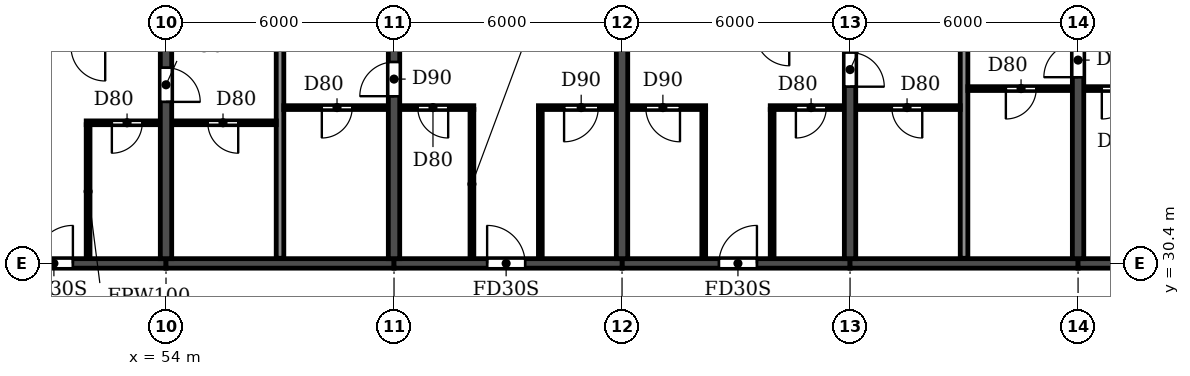
"""IFC4 building model, lengths in metres.
Left out: names, types, materials, properties, quantities, classifications, styles, units other than length and angle.
Written with IfcOpenShell. Run it as: python <this file> out.ifc"""

import sys

from ifc_helpers import new_model, si_unit, direction, frame, frame_2d, origin, place, context, subcontext, project, spatial, rectangle, extrude, element, fill, save


model = new_model("IFC4")
c1 = context("Model", 3, precision=1e-05, world=origin(), true_north=direction((0.0, 1.0)))
c2 = subcontext(c1, "Body", "Model", "MODEL_VIEW")
j1 = project(units=[si_unit("LENGTHUNIT", "METRE"), si_unit("PLANEANGLEUNIT", "RADIAN")], contexts=[c1])
p1 = place(None, origin())
s1 = spatial("IfcSite", under=j1, at=p1, CompositionType="ELEMENT")
p2 = place(p1, origin())
s2 = spatial("IfcBuilding", under=s1, at=p2, CompositionType="ELEMENT")
p3 = place(p2, frame((0.0, 0.0, 125.7)))
s3 = spatial("IfcBuildingStorey", under=s2, at=p3, CompositionType="ELEMENT", Elevation=125.7)
p4 = place(p3, frame((54.0, 30.525, 0.0), z_axis=(0.0, 0.0, 1.0), x_axis=(0.0, 1.0, 0.0)))
e1 = element("IfcWall", 1, at=p4, inside=s3, PredefinedType="SHEAR", context=c2, shape_type="SweptSolid", body=[
    extrude(rectangle(XDim=11.675, YDim=0.3, at=frame_2d((5.837, 0.0))), origin(), (0.0, 0.0, 1.0), 3.07),
])
p5 = place(p4, frame((4.125, 0.0, 0.0)))
e2 = element("IfcOpeningElement", 2, at=p5, cuts=e1, PredefinedType="OPENING", context=c2, shape_type="SweptSolid", body=[
    extrude(rectangle(XDim=0.9, YDim=2.1, at=frame_2d((0.45, 1.05))), frame((0.0, 0.16, 0.0), z_axis=(0.0, -1.0, 0.0), x_axis=(1.0, 0.0, 0.0)), (0.0, 0.0, 1.0), 0.32),
])
p6 = place(p3, frame((60.0, 30.525, 0.0), z_axis=(0.0, 0.0, 1.0), x_axis=(0.0, 1.0, 0.0)))
e3 = element("IfcWall", 3, at=p6, inside=s3, PredefinedType="SHEAR", context=c2, shape_type="SweptSolid", body=[
    extrude(rectangle(XDim=11.675, YDim=0.3, at=frame_2d((5.837, 0.0))), origin(), (0.0, 0.0, 1.0), 3.07),
])
p7 = place(p6, frame((4.275, 0.0, 0.0)))
e4 = element("IfcOpeningElement", 4, at=p7, cuts=e3, PredefinedType="OPENING", context=c2, shape_type="SweptSolid", body=[
    extrude(rectangle(XDim=0.9, YDim=2.1, at=frame_2d((0.45, 1.05))), frame((0.0, 0.16, 0.0), z_axis=(0.0, -1.0, 0.0), x_axis=(1.0, 0.0, 0.0)), (0.0, 0.0, 1.0), 0.32),
])
p8 = place(p3, frame((66.0, 30.525, 0.0), z_axis=(0.0, 0.0, 1.0), x_axis=(0.0, 1.0, 0.0)))
e5 = element("IfcWall", 5, at=p8, inside=s3, PredefinedType="SHEAR", context=c2, shape_type="SweptSolid", body=[
    extrude(rectangle(XDim=11.675, YDim=0.3, at=frame_2d((5.837, 0.0))), origin(), (0.0, 0.0, 1.0), 3.07),
])
p9 = place(p3, frame((72.0, 30.525, 0.0), z_axis=(0.0, 0.0, 1.0), x_axis=(0.0, 1.0, 0.0)))
e6 = element("IfcWall", 6, at=p9, inside=s3, PredefinedType="SHEAR", context=c2, shape_type="SweptSolid", body=[
    extrude(rectangle(XDim=11.675, YDim=0.3, at=frame_2d((5.837, 0.0))), origin(), (0.0, 0.0, 1.0), 3.07),
])
p10 = place(p9, frame((4.525, 0.0, 0.0)))
e7 = element("IfcOpeningElement", 7, at=p10, cuts=e6, PredefinedType="OPENING", context=c2, shape_type="SweptSolid", body=[
    extrude(rectangle(XDim=0.9, YDim=2.1, at=frame_2d((0.45, 1.05))), frame((0.0, 0.16, 0.0), z_axis=(0.0, -1.0, 0.0), x_axis=(1.0, 0.0, 0.0)), (0.0, 0.0, 1.0), 0.32),
])
p11 = place(p3, frame((78.0, 30.525, 0.0), z_axis=(0.0, 0.0, 1.0), x_axis=(0.0, 1.0, 0.0)))
e8 = element("IfcWall", 8, at=p11, inside=s3, PredefinedType="SHEAR", context=c2, shape_type="SweptSolid", body=[
    extrude(rectangle(XDim=11.675, YDim=0.3, at=frame_2d((5.837, 0.0))), origin(), (0.0, 0.0, 1.0), 3.07),
])
p12 = place(p11, frame((4.775, 0.0, 0.0)))
e9 = element("IfcOpeningElement", 9, at=p12, cuts=e8, PredefinedType="OPENING", context=c2, shape_type="SweptSolid", body=[
    extrude(rectangle(XDim=0.9, YDim=2.1, at=frame_2d((0.45, 1.05))), frame((0.0, 0.16, 0.0), z_axis=(0.0, -1.0, 0.0), x_axis=(1.0, 0.0, 0.0)), (0.0, 0.0, 1.0), 0.32),
])
p13 = place(p3, frame((48.0, 30.4, 0.0), z_axis=(0.0, 0.0, 1.0), x_axis=(1.0, 0.0, 0.0)))
e10 = element("IfcWall", 10, at=p13, inside=s3, PredefinedType="SHEAR", context=c2, shape_type="SweptSolid", body=[
    extrude(rectangle(XDim=6.0, YDim=0.25, at=frame_2d((3.0, 0.0))), origin(), (0.0, 0.0, 1.0), 2.47),
])
p14 = place(p13, frame((2.55, 0.0, 0.0)))
e11 = element("IfcOpeningElement", 11, at=p14, cuts=e10, PredefinedType="OPENING", context=c2, shape_type="SweptSolid", body=[
    extrude(rectangle(XDim=1.0, YDim=2.1, at=frame_2d((0.5, 1.05))), frame((0.0, 0.135, 0.0), z_axis=(0.0, -1.0, 0.0), x_axis=(1.0, 0.0, 0.0)), (0.0, 0.0, 1.0), 0.27),
])
p15 = place(p3, frame((54.0, 30.4, 0.0), z_axis=(0.0, 0.0, 1.0), x_axis=(1.0, 0.0, 0.0)))
e12 = element("IfcWall", 12, at=p15, inside=s3, PredefinedType="SHEAR", context=c2, shape_type="SweptSolid", body=[
    extrude(rectangle(XDim=6.0, YDim=0.25, at=frame_2d((3.0, 0.0))), origin(), (0.0, 0.0, 1.0), 2.47),
])
p16 = place(p3, frame((60.0, 30.4, 0.0), z_axis=(0.0, 0.0, 1.0), x_axis=(1.0, 0.0, 0.0)))
e13 = element("IfcWall", 13, at=p16, inside=s3, PredefinedType="SHEAR", context=c2, shape_type="SweptSolid", body=[
    extrude(rectangle(XDim=6.0, YDim=0.25, at=frame_2d((3.0, 0.0))), origin(), (0.0, 0.0, 1.0), 2.47),
])
p17 = place(p16, frame((2.45, 0.0, 0.0)))
e14 = element("IfcOpeningElement", 14, at=p17, cuts=e13, PredefinedType="OPENING", context=c2, shape_type="SweptSolid", body=[
    extrude(rectangle(XDim=1.0, YDim=2.1, at=frame_2d((0.5, 1.05))), frame((0.0, 0.135, 0.0), z_axis=(0.0, -1.0, 0.0), x_axis=(1.0, 0.0, 0.0)), (0.0, 0.0, 1.0), 0.27),
])
p18 = place(p3, frame((66.0, 30.4, 0.0), z_axis=(0.0, 0.0, 1.0), x_axis=(1.0, 0.0, 0.0)))
e15 = element("IfcWall", 15, at=p18, inside=s3, PredefinedType="SHEAR", context=c2, shape_type="SweptSolid", body=[
    extrude(rectangle(XDim=6.0, YDim=0.25, at=frame_2d((3.0, 0.0))), origin(), (0.0, 0.0, 1.0), 2.47),
])
p19 = place(p18, frame((2.55, 0.0, 0.0)))
e16 = element("IfcOpeningElement", 16, at=p19, cuts=e15, PredefinedType="OPENING", context=c2, shape_type="SweptSolid", body=[
    extrude(rectangle(XDim=1.0, YDim=2.1, at=frame_2d((0.5, 1.05))), frame((0.0, 0.135, 0.0), z_axis=(0.0, -1.0, 0.0), x_axis=(1.0, 0.0, 0.0)), (0.0, 0.0, 1.0), 0.27),
])
p20 = place(p3, frame((72.0, 30.4, 0.0), z_axis=(0.0, 0.0, 1.0), x_axis=(1.0, 0.0, 0.0)))
e17 = element("IfcWall", 17, at=p20, inside=s3, PredefinedType="SHEAR", context=c2, shape_type="SweptSolid", body=[
    extrude(rectangle(XDim=6.0, YDim=0.25, at=frame_2d((3.0, 0.0))), origin(), (0.0, 0.0, 1.0), 2.47),
])
p21 = place(p3, frame((78.0, 30.4, 0.0), z_axis=(0.0, 0.0, 1.0), x_axis=(1.0, 0.0, 0.0)))
e18 = element("IfcWall", 18, at=p21, inside=s3, PredefinedType="SHEAR", context=c2, shape_type="SweptSolid", body=[
    extrude(rectangle(XDim=6.0, YDim=0.25, at=frame_2d((3.0, 0.0))), origin(), (0.0, 0.0, 1.0), 2.47),
])
p22 = place(p21, frame((2.45, 0.0, 0.0)))
e19 = element("IfcOpeningElement", 19, at=p22, cuts=e18, PredefinedType="OPENING", context=c2, shape_type="SweptSolid", body=[
    extrude(rectangle(XDim=1.0, YDim=2.1, at=frame_2d((0.5, 1.05))), frame((0.0, 0.135, 0.0), z_axis=(0.0, -1.0, 0.0), x_axis=(1.0, 0.0, 0.0)), (0.0, 0.0, 1.0), 0.27),
])
for number, where, z_axis, x_axis in (
    (20, (57.0, 30.535, 0.0), (0.0, 0.0, 1.0), (0.0, 1.0, 0.0)),
    (21, (75.0, 30.535, 0.0), (0.0, 0.0, 1.0), (0.0, 1.0, 0.0)),
):
    element("IfcWall", number, at=place(p3, frame(where, z_axis=z_axis, x_axis=x_axis)), inside=s3, PredefinedType="PARTITIONING", context=c2, shape_type="SweptSolid", body=[
        extrude(rectangle(XDim=11.805, YDim=0.2, at=frame_2d((5.903, 0.0))), origin(), (0.0, 0.0, 1.0), 3.07),
    ])
p23 = place(p3, frame((51.9, 34.1, 0.0), z_axis=(0.0, 0.0, 1.0), x_axis=(1.0, 0.0, 0.0)))
e22 = element("IfcWall", 22, at=p23, inside=s3, PredefinedType="PARTITIONING", context=c2, shape_type="SweptSolid", body=[
    extrude(rectangle(XDim=1.94, YDim=0.1, at=frame_2d((0.97, 0.0))), origin(), (0.0, 0.0, 1.0), 3.07),
])
p24 = place(p23, frame((0.675, 0.0, 0.0)))
e23 = element("IfcOpeningElement", 23, at=p24, cuts=e22, PredefinedType="OPENING", context=c2, shape_type="SweptSolid", body=[
    extrude(rectangle(XDim=0.8, YDim=2.1, at=frame_2d((0.4, 1.05))), frame((0.0, 0.06, 0.0), z_axis=(0.0, -1.0, 0.0), x_axis=(1.0, 0.0, 0.0)), (0.0, 0.0, 1.0), 0.12),
])
p25 = place(p3, frame((54.16, 34.1, 0.0), z_axis=(0.0, 0.0, 1.0), x_axis=(1.0, 0.0, 0.0)))
e24 = element("IfcWall", 24, at=p25, inside=s3, PredefinedType="PARTITIONING", context=c2, shape_type="SweptSolid", body=[
    extrude(rectangle(XDim=2.74, YDim=0.1, at=frame_2d((1.37, 0.0))), origin(), (0.0, 0.0, 1.0), 3.07),
])
p26 = place(p25, frame((0.94, 0.0, 0.0)))
e25 = element("IfcOpeningElement", 25, at=p26, cuts=e24, PredefinedType="OPENING", context=c2, shape_type="SweptSolid", body=[
    extrude(rectangle(XDim=0.8, YDim=2.1, at=frame_2d((0.4, 1.05))), frame((0.0, 0.06, 0.0), z_axis=(0.0, -1.0, 0.0), x_axis=(1.0, 0.0, 0.0)), (0.0, 0.0, 1.0), 0.12),
])
p27 = place(p3, frame((57.1, 34.5, 0.0), z_axis=(0.0, 0.0, 1.0), x_axis=(1.0, 0.0, 0.0)))
e26 = element("IfcWall", 26, at=p27, inside=s3, PredefinedType="PARTITIONING", context=c2, shape_type="SweptSolid", body=[
    extrude(rectangle(XDim=2.74, YDim=0.1, at=frame_2d((1.37, 0.0))), origin(), (0.0, 0.0, 1.0), 3.07),
])
p28 = place(p27, frame((1.0, 0.0, 0.0)))
e27 = element("IfcOpeningElement", 27, at=p28, cuts=e26, PredefinedType="OPENING", context=c2, shape_type="SweptSolid", body=[
    extrude(rectangle(XDim=0.8, YDim=2.1, at=frame_2d((0.4, 1.05))), frame((0.0, 0.06, 0.0), z_axis=(0.0, -1.0, 0.0), x_axis=(1.0, 0.0, 0.0)), (0.0, 0.0, 1.0), 0.12),
])
p29 = place(p3, frame((60.16, 34.5, 0.0), z_axis=(0.0, 0.0, 1.0), x_axis=(1.0, 0.0, 0.0)))
e28 = element("IfcWall", 28, at=p29, inside=s3, PredefinedType="PARTITIONING", context=c2, shape_type="SweptSolid", body=[
    extrude(rectangle(XDim=1.94, YDim=0.1, at=frame_2d((0.97, 0.0))), origin(), (0.0, 0.0, 1.0), 3.07),
])
p30 = place(p29, frame((0.465, 0.0, 0.0)))
e29 = element("IfcOpeningElement", 29, at=p30, cuts=e28, PredefinedType="OPENING", context=c2, shape_type="SweptSolid", body=[
    extrude(rectangle(XDim=0.8, YDim=2.1, at=frame_2d((0.4, 1.05))), frame((0.0, 0.06, 0.0), z_axis=(0.0, -1.0, 0.0), x_axis=(1.0, 0.0, 0.0)), (0.0, 0.0, 1.0), 0.12),
])
p31 = place(p3, frame((63.8, 34.5, 0.0), z_axis=(0.0, 0.0, 1.0), x_axis=(1.0, 0.0, 0.0)))
e30 = element("IfcWall", 30, at=p31, inside=s3, PredefinedType="PARTITIONING", context=c2, shape_type="SweptSolid", body=[
    extrude(rectangle(XDim=2.04, YDim=0.1, at=frame_2d((1.02, 0.0))), origin(), (0.0, 0.0, 1.0), 3.07),
])
p32 = place(p31, frame((0.675, 0.0, 0.0)))
e31 = element("IfcOpeningElement", 31, at=p32, cuts=e30, PredefinedType="OPENING", context=c2, shape_type="SweptSolid", body=[
    extrude(rectangle(XDim=0.9, YDim=2.1, at=frame_2d((0.45, 1.05))), frame((0.0, 0.06, 0.0), z_axis=(0.0, -1.0, 0.0), x_axis=(1.0, 0.0, 0.0)), (0.0, 0.0, 1.0), 0.12),
])
p33 = place(p3, frame((66.16, 34.5, 0.0), z_axis=(0.0, 0.0, 1.0), x_axis=(1.0, 0.0, 0.0)))
e32 = element("IfcWall", 32, at=p33, inside=s3, PredefinedType="PARTITIONING", context=c2, shape_type="SweptSolid", body=[
    extrude(rectangle(XDim=2.04, YDim=0.1, at=frame_2d((1.02, 0.0))), origin(), (0.0, 0.0, 1.0), 3.07),
])
p34 = place(p33, frame((0.465, 0.0, 0.0)))
e33 = element("IfcOpeningElement", 33, at=p34, cuts=e32, PredefinedType="OPENING", context=c2, shape_type="SweptSolid", body=[
    extrude(rectangle(XDim=0.9, YDim=2.1, at=frame_2d((0.45, 1.05))), frame((0.0, 0.06, 0.0), z_axis=(0.0, -1.0, 0.0), x_axis=(1.0, 0.0, 0.0)), (0.0, 0.0, 1.0), 0.12),
])
p35 = place(p3, frame((69.9, 34.5, 0.0), z_axis=(0.0, 0.0, 1.0), x_axis=(1.0, 0.0, 0.0)))
e34 = element("IfcWall", 34, at=p35, inside=s3, PredefinedType="PARTITIONING", context=c2, shape_type="SweptSolid", body=[
    extrude(rectangle(XDim=1.94, YDim=0.1, at=frame_2d((0.97, 0.0))), origin(), (0.0, 0.0, 1.0), 3.07),
])
p36 = place(p35, frame((0.675, 0.0, 0.0)))
e35 = element("IfcOpeningElement", 35, at=p36, cuts=e34, PredefinedType="OPENING", context=c2, shape_type="SweptSolid", body=[
    extrude(rectangle(XDim=0.8, YDim=2.1, at=frame_2d((0.4, 1.05))), frame((0.0, 0.06, 0.0), z_axis=(0.0, -1.0, 0.0), x_axis=(1.0, 0.0, 0.0)), (0.0, 0.0, 1.0), 0.12),
])
p37 = place(p3, frame((72.16, 34.5, 0.0), z_axis=(0.0, 0.0, 1.0), x_axis=(1.0, 0.0, 0.0)))
e36 = element("IfcWall", 36, at=p37, inside=s3, PredefinedType="PARTITIONING", context=c2, shape_type="SweptSolid", body=[
    extrude(rectangle(XDim=2.74, YDim=0.1, at=frame_2d((1.37, 0.0))), origin(), (0.0, 0.0, 1.0), 3.07),
])
p38 = place(p37, frame((0.94, 0.0, 0.0)))
e37 = element("IfcOpeningElement", 37, at=p38, cuts=e36, PredefinedType="OPENING", context=c2, shape_type="SweptSolid", body=[
    extrude(rectangle(XDim=0.8, YDim=2.1, at=frame_2d((0.4, 1.05))), frame((0.0, 0.06, 0.0), z_axis=(0.0, -1.0, 0.0), x_axis=(1.0, 0.0, 0.0)), (0.0, 0.0, 1.0), 0.12),
])
p39 = place(p3, frame((75.1, 35.0, 0.0), z_axis=(0.0, 0.0, 1.0), x_axis=(1.0, 0.0, 0.0)))
e38 = element("IfcWall", 38, at=p39, inside=s3, PredefinedType="PARTITIONING", context=c2, shape_type="SweptSolid", body=[
    extrude(rectangle(XDim=2.74, YDim=0.1, at=frame_2d((1.37, 0.0))), origin(), (0.0, 0.0, 1.0), 3.07),
])
p40 = place(p39, frame((1.0, 0.0, 0.0)))
e39 = element("IfcOpeningElement", 39, at=p40, cuts=e38, PredefinedType="OPENING", context=c2, shape_type="SweptSolid", body=[
    extrude(rectangle(XDim=0.8, YDim=2.1, at=frame_2d((0.4, 1.05))), frame((0.0, 0.06, 0.0), z_axis=(0.0, -1.0, 0.0), x_axis=(1.0, 0.0, 0.0)), (0.0, 0.0, 1.0), 0.12),
])
p41 = place(p3, frame((78.16, 35.0, 0.0), z_axis=(0.0, 0.0, 1.0), x_axis=(1.0, 0.0, 0.0)))
e40 = element("IfcWall", 40, at=p41, inside=s3, PredefinedType="PARTITIONING", context=c2, shape_type="SweptSolid", body=[
    extrude(rectangle(XDim=1.94, YDim=0.1, at=frame_2d((0.97, 0.0))), origin(), (0.0, 0.0, 1.0), 3.07),
])
p42 = place(p41, frame((0.465, 0.0, 0.0)))
e41 = element("IfcOpeningElement", 41, at=p42, cuts=e40, PredefinedType="OPENING", context=c2, shape_type="SweptSolid", body=[
    extrude(rectangle(XDim=0.8, YDim=2.1, at=frame_2d((0.4, 1.05))), frame((0.0, 0.06, 0.0), z_axis=(0.0, -1.0, 0.0), x_axis=(1.0, 0.0, 0.0)), (0.0, 0.0, 1.0), 0.12),
])
p43 = place(p3, frame((51.95, 30.535, 0.0), z_axis=(0.0, 0.0, 1.0), x_axis=(0.0, 1.0, 0.0)))
e42 = element("IfcWall", 42, at=p43, inside=s3, PredefinedType="PARTITIONING", context=c2, shape_type="SweptSolid", body=[
    extrude(rectangle(XDim=3.515, YDim=0.1, at=frame_2d((1.758, 0.0))), origin(), (0.0, 0.0, 1.0), 3.07),
])
for number, where, z_axis, x_axis in (
    (43, (62.05, 30.535, 0.0), (0.0, 0.0, 1.0), (0.0, 1.0, 0.0)),
    (44, (63.85, 30.535, 0.0), (0.0, 0.0, 1.0), (0.0, 1.0, 0.0)),
    (45, (68.15, 30.535, 0.0), (0.0, 0.0, 1.0), (0.0, 1.0, 0.0)),
    (46, (69.95, 30.535, 0.0), (0.0, 0.0, 1.0), (0.0, 1.0, 0.0)),
):
    element("IfcWall", number, at=place(p3, frame(where, z_axis=z_axis, x_axis=x_axis)), inside=s3, PredefinedType="PARTITIONING", context=c2, shape_type="SweptSolid", body=[
        extrude(rectangle(XDim=3.915, YDim=0.1, at=frame_2d((1.958, 0.0))), origin(), (0.0, 0.0, 1.0), 3.07),
    ])
p44 = place(p26, frame((0.8, 0.0, 0.0), z_axis=(0.0, 0.0, 1.0), x_axis=(-1.0, 0.0, 0.0)))
e47 = element("IfcDoor", 47, at=p44, inside=s3, OperationType="SINGLE_SWING_LEFT", PredefinedType="DOOR", context=c2, shape_type="SweptSolid", body=[
    extrude(rectangle(XDim=0.8, YDim=2.1, at=frame_2d((0.4, 1.05))), frame((0.0, 0.025, 0.0), z_axis=(0.0, -1.0, 0.0), x_axis=(1.0, 0.0, 0.0)), (0.0, 0.0, 1.0), 0.05),
])
fill(e25, e47)
p45 = place(p14, origin())
e48 = element("IfcDoor", 48, at=p45, inside=s3, OperationType="SINGLE_SWING_RIGHT", PredefinedType="DOOR", context=c2, shape_type="SweptSolid", body=[
    extrude(rectangle(XDim=1.0, YDim=2.1, at=frame_2d((0.5, 1.05))), frame((0.0, 0.025, 0.0), z_axis=(0.0, -1.0, 0.0), x_axis=(1.0, 0.0, 0.0)), (0.0, 0.0, 1.0), 0.05),
])
fill(e11, e48)
p46 = place(p24, frame((0.8, 0.0, 0.0), z_axis=(0.0, 0.0, 1.0), x_axis=(-1.0, 0.0, 0.0)))
e49 = element("IfcDoor", 49, at=p46, inside=s3, OperationType="SINGLE_SWING_RIGHT", PredefinedType="DOOR", context=c2, shape_type="SweptSolid", body=[
    extrude(rectangle(XDim=0.8, YDim=2.1, at=frame_2d((0.4, 1.05))), frame((0.0, 0.025, 0.0), z_axis=(0.0, -1.0, 0.0), x_axis=(1.0, 0.0, 0.0)), (0.0, 0.0, 1.0), 0.05),
])
fill(e23, e49)
p47 = place(p5, frame((0.9, 0.0, 0.0), z_axis=(0.0, 0.0, 1.0), x_axis=(-1.0, 0.0, 0.0)))
e50 = element("IfcDoor", 50, at=p47, inside=s3, OperationType="SINGLE_SWING_RIGHT", PredefinedType="DOOR", context=c2, shape_type="SweptSolid", body=[
    extrude(rectangle(XDim=0.9, YDim=2.1, at=frame_2d((0.45, 1.05))), frame((0.0, 0.025, 0.0), z_axis=(0.0, -1.0, 0.0), x_axis=(1.0, 0.0, 0.0)), (0.0, 0.0, 1.0), 0.05),
])
fill(e2, e50)
p48 = place(p28, frame((0.8, 0.0, 0.0), z_axis=(0.0, 0.0, 1.0), x_axis=(-1.0, 0.0, 0.0)))
e51 = element("IfcDoor", 51, at=p48, inside=s3, OperationType="SINGLE_SWING_RIGHT", PredefinedType="DOOR", context=c2, shape_type="SweptSolid", body=[
    extrude(rectangle(XDim=0.8, YDim=2.1, at=frame_2d((0.4, 1.05))), frame((0.0, 0.025, 0.0), z_axis=(0.0, -1.0, 0.0), x_axis=(1.0, 0.0, 0.0)), (0.0, 0.0, 1.0), 0.05),
])
fill(e27, e51)
p49 = place(p7, origin())
e52 = element("IfcDoor", 52, at=p49, inside=s3, OperationType="SINGLE_SWING_LEFT", PredefinedType="DOOR", context=c2, shape_type="SweptSolid", body=[
    extrude(rectangle(XDim=0.9, YDim=2.1, at=frame_2d((0.45, 1.05))), frame((0.0, 0.025, 0.0), z_axis=(0.0, -1.0, 0.0), x_axis=(1.0, 0.0, 0.0)), (0.0, 0.0, 1.0), 0.05),
])
fill(e4, e52)
p50 = place(p30, frame((0.8, 0.0, 0.0), z_axis=(0.0, 0.0, 1.0), x_axis=(-1.0, 0.0, 0.0)))
e53 = element("IfcDoor", 53, at=p50, inside=s3, OperationType="SINGLE_SWING_LEFT", PredefinedType="DOOR", context=c2, shape_type="SweptSolid", body=[
    extrude(rectangle(XDim=0.8, YDim=2.1, at=frame_2d((0.4, 1.05))), frame((0.0, 0.025, 0.0), z_axis=(0.0, -1.0, 0.0), x_axis=(1.0, 0.0, 0.0)), (0.0, 0.0, 1.0), 0.05),
])
fill(e29, e53)
p51 = place(p17, origin())
e54 = element("IfcDoor", 54, at=p51, inside=s3, OperationType="SINGLE_SWING_LEFT", PredefinedType="DOOR", context=c2, shape_type="SweptSolid", body=[
    extrude(rectangle(XDim=1.0, YDim=2.1, at=frame_2d((0.5, 1.05))), frame((0.0, 0.025, 0.0), z_axis=(0.0, -1.0, 0.0), x_axis=(1.0, 0.0, 0.0)), (0.0, 0.0, 1.0), 0.05),
])
fill(e14, e54)
p52 = place(p32, frame((0.9, 0.0, 0.0), z_axis=(0.0, 0.0, 1.0), x_axis=(-1.0, 0.0, 0.0)))
e55 = element("IfcDoor", 55, at=p52, inside=s3, OperationType="SINGLE_SWING_RIGHT", PredefinedType="DOOR", context=c2, shape_type="SweptSolid", body=[
    extrude(rectangle(XDim=0.9, YDim=2.1, at=frame_2d((0.45, 1.05))), frame((0.0, 0.025, 0.0), z_axis=(0.0, -1.0, 0.0), x_axis=(1.0, 0.0, 0.0)), (0.0, 0.0, 1.0), 0.05),
])
fill(e31, e55)
p53 = place(p38, frame((0.8, 0.0, 0.0), z_axis=(0.0, 0.0, 1.0), x_axis=(-1.0, 0.0, 0.0)))
e56 = element("IfcDoor", 56, at=p53, inside=s3, OperationType="SINGLE_SWING_LEFT", PredefinedType="DOOR", context=c2, shape_type="SweptSolid", body=[
    extrude(rectangle(XDim=0.8, YDim=2.1, at=frame_2d((0.4, 1.05))), frame((0.0, 0.025, 0.0), z_axis=(0.0, -1.0, 0.0), x_axis=(1.0, 0.0, 0.0)), (0.0, 0.0, 1.0), 0.05),
])
fill(e37, e56)
p54 = place(p34, frame((0.9, 0.0, 0.0), z_axis=(0.0, 0.0, 1.0), x_axis=(-1.0, 0.0, 0.0)))
e57 = element("IfcDoor", 57, at=p54, inside=s3, OperationType="SINGLE_SWING_LEFT", PredefinedType="DOOR", context=c2, shape_type="SweptSolid", body=[
    extrude(rectangle(XDim=0.9, YDim=2.1, at=frame_2d((0.45, 1.05))), frame((0.0, 0.025, 0.0), z_axis=(0.0, -1.0, 0.0), x_axis=(1.0, 0.0, 0.0)), (0.0, 0.0, 1.0), 0.05),
])
fill(e33, e57)
p55 = place(p19, origin())
e58 = element("IfcDoor", 58, at=p55, inside=s3, OperationType="SINGLE_SWING_RIGHT", PredefinedType="DOOR", context=c2, shape_type="SweptSolid", body=[
    extrude(rectangle(XDim=1.0, YDim=2.1, at=frame_2d((0.5, 1.05))), frame((0.0, 0.025, 0.0), z_axis=(0.0, -1.0, 0.0), x_axis=(1.0, 0.0, 0.0)), (0.0, 0.0, 1.0), 0.05),
])
fill(e16, e58)
p56 = place(p36, frame((0.8, 0.0, 0.0), z_axis=(0.0, 0.0, 1.0), x_axis=(-1.0, 0.0, 0.0)))
e59 = element("IfcDoor", 59, at=p56, inside=s3, OperationType="SINGLE_SWING_RIGHT", PredefinedType="DOOR", context=c2, shape_type="SweptSolid", body=[
    extrude(rectangle(XDim=0.8, YDim=2.1, at=frame_2d((0.4, 1.05))), frame((0.0, 0.025, 0.0), z_axis=(0.0, -1.0, 0.0), x_axis=(1.0, 0.0, 0.0)), (0.0, 0.0, 1.0), 0.05),
])
fill(e35, e59)
p57 = place(p10, frame((0.9, 0.0, 0.0), z_axis=(0.0, 0.0, 1.0), x_axis=(-1.0, 0.0, 0.0)))
e60 = element("IfcDoor", 60, at=p57, inside=s3, OperationType="SINGLE_SWING_RIGHT", PredefinedType="DOOR", context=c2, shape_type="SweptSolid", body=[
    extrude(rectangle(XDim=0.9, YDim=2.1, at=frame_2d((0.45, 1.05))), frame((0.0, 0.025, 0.0), z_axis=(0.0, -1.0, 0.0), x_axis=(1.0, 0.0, 0.0)), (0.0, 0.0, 1.0), 0.05),
])
fill(e7, e60)
p58 = place(p40, frame((0.8, 0.0, 0.0), z_axis=(0.0, 0.0, 1.0), x_axis=(-1.0, 0.0, 0.0)))
e61 = element("IfcDoor", 61, at=p58, inside=s3, OperationType="SINGLE_SWING_RIGHT", PredefinedType="DOOR", context=c2, shape_type="SweptSolid", body=[
    extrude(rectangle(XDim=0.8, YDim=2.1, at=frame_2d((0.4, 1.05))), frame((0.0, 0.025, 0.0), z_axis=(0.0, -1.0, 0.0), x_axis=(1.0, 0.0, 0.0)), (0.0, 0.0, 1.0), 0.05),
])
fill(e39, e61)
p59 = place(p12, origin())
e62 = element("IfcDoor", 62, at=p59, inside=s3, OperationType="SINGLE_SWING_LEFT", PredefinedType="DOOR", context=c2, shape_type="SweptSolid", body=[
    extrude(rectangle(XDim=0.9, YDim=2.1, at=frame_2d((0.45, 1.05))), frame((0.0, 0.025, 0.0), z_axis=(0.0, -1.0, 0.0), x_axis=(1.0, 0.0, 0.0)), (0.0, 0.0, 1.0), 0.05),
])
fill(e9, e62)
p60 = place(p42, frame((0.8, 0.0, 0.0), z_axis=(0.0, 0.0, 1.0), x_axis=(-1.0, 0.0, 0.0)))
e63 = element("IfcDoor", 63, at=p60, inside=s3, OperationType="SINGLE_SWING_RIGHT", PredefinedType="DOOR", context=c2, shape_type="SweptSolid", body=[
    extrude(rectangle(XDim=0.8, YDim=2.1, at=frame_2d((0.4, 1.05))), frame((0.0, 0.025, 0.0), z_axis=(0.0, -1.0, 0.0), x_axis=(1.0, 0.0, 0.0)), (0.0, 0.0, 1.0), 0.05),
])
fill(e41, e63)
save(model, sys.argv[1])
